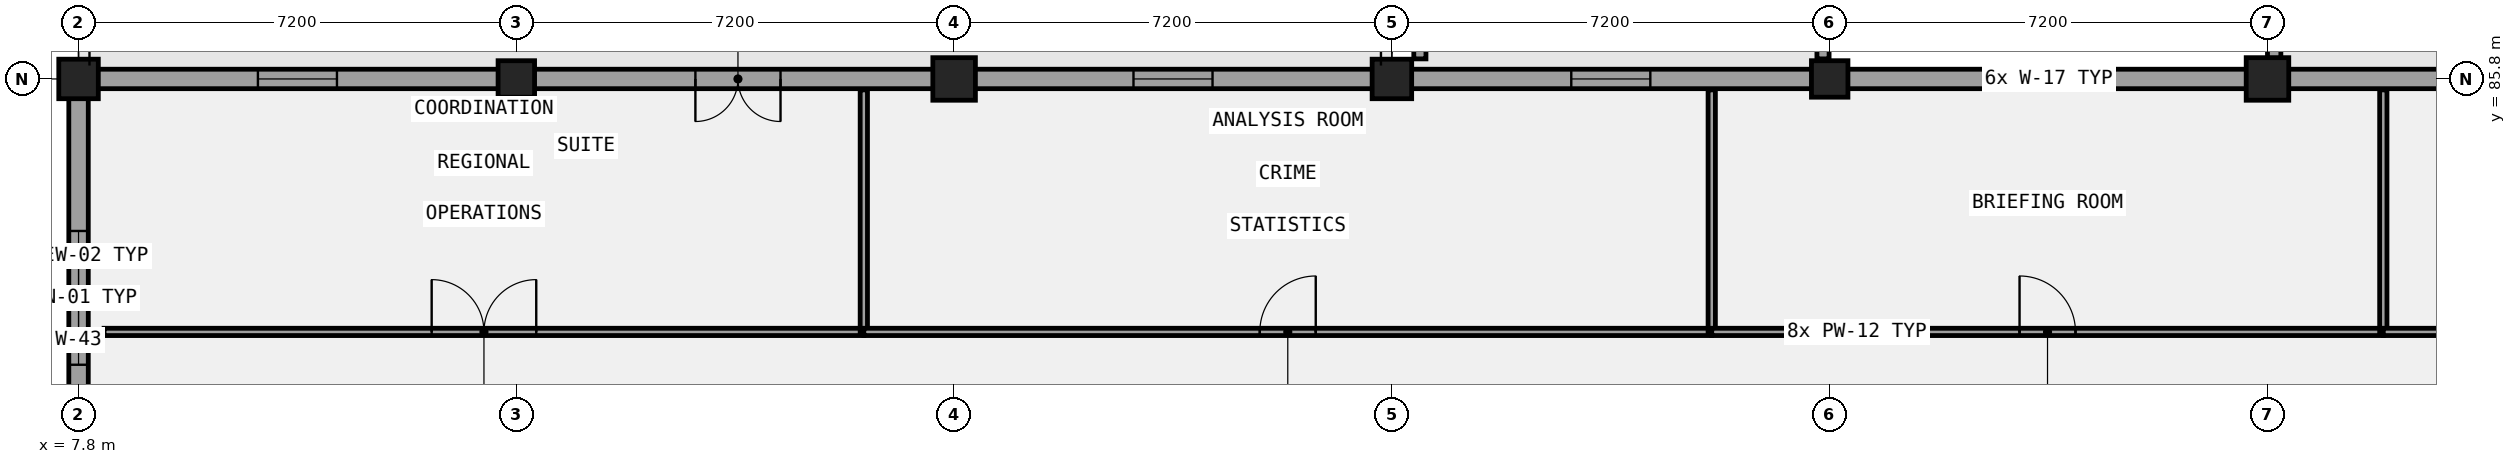
"""IFC4 building model, lengths in metres.
Left out: names, types, materials, properties, quantities, classifications, styles, units other than length and angle.
Written with IfcOpenShell. Run it as: python <this file> out.ifc"""

import sys

from ifc_helpers import new_model, si_unit, direction, frame, frame_2d, origin, origin_2d, place, context, subcontext, project, spatial, rectangle, extrude, element, fill, save


model = new_model("IFC4")
c1 = context("Model", 3, precision=1e-05, world=origin(), true_north=direction((0.0, 1.0)))
c2 = subcontext(c1, "Body", "Model", "MODEL_VIEW")
j1 = project(units=[si_unit("LENGTHUNIT", "METRE"), si_unit("PLANEANGLEUNIT", "RADIAN")], contexts=[c1])
p1 = place(None, origin())
s1 = spatial("IfcSite", under=j1, at=p1, CompositionType="ELEMENT")
p2 = place(p1, origin())
s2 = spatial("IfcBuilding", under=s1, at=p2, CompositionType="ELEMENT")
p3 = place(p2, frame((0.0, 0.0, 9.6)))
s3 = spatial("IfcBuildingStorey", under=s2, at=p3, CompositionType="ELEMENT", Elevation=9.6)
p4 = place(p3, frame((7.8, 85.8, 0.0), z_axis=(0.0, 0.0, 1.0), x_axis=(1.0, 0.0, 0.0)))
e1 = element("IfcColumn", 1, at=p4, inside=s3, PredefinedType="COLUMN", context=c2, shape_type="SweptSolid", body=[
    extrude(rectangle(XDim=0.65, YDim=0.65, at=origin_2d()), origin(), (0.0, 0.0, 1.0), 4.2),
])
p5 = place(p3, frame((15.0, 85.8, 0.0), z_axis=(0.0, 0.0, 1.0), x_axis=(1.0, 0.0, 0.0)))
e2 = element("IfcColumn", 2, at=p5, inside=s3, PredefinedType="COLUMN", context=c2, shape_type="SweptSolid", body=[
    extrude(rectangle(XDim=0.6, YDim=0.6, at=origin_2d()), origin(), (0.0, 0.0, 1.0), 4.2),
])
p6 = place(p3, frame((22.2, 85.8, 0.0), z_axis=(0.0, 0.0, 1.0), x_axis=(1.0, 0.0, 0.0)))
e3 = element("IfcColumn", 3, at=p6, inside=s3, PredefinedType="COLUMN", context=c2, shape_type="SweptSolid", body=[
    extrude(rectangle(XDim=0.7, YDim=0.7, at=origin_2d()), origin(), (0.0, 0.0, 1.0), 4.2),
])
p7 = place(p3, frame((29.4, 85.8, 0.0), z_axis=(0.0, 0.0, 1.0), x_axis=(1.0, 0.0, 0.0)))
e4 = element("IfcColumn", 4, at=p7, inside=s3, PredefinedType="COLUMN", context=c2, shape_type="SweptSolid", body=[
    extrude(rectangle(XDim=0.65, YDim=0.65, at=origin_2d()), origin(), (0.0, 0.0, 1.0), 4.2),
])
p8 = place(p3, frame((36.6, 85.8, 0.0), z_axis=(0.0, 0.0, 1.0), x_axis=(1.0, 0.0, 0.0)))
e5 = element("IfcColumn", 5, at=p8, inside=s3, PredefinedType="COLUMN", context=c2, shape_type="SweptSolid", body=[
    extrude(rectangle(XDim=0.6, YDim=0.6, at=origin_2d()), origin(), (0.0, 0.0, 1.0), 4.2),
])
p9 = place(p3, frame((43.8, 85.8, 0.0), z_axis=(0.0, 0.0, 1.0), x_axis=(1.0, 0.0, 0.0)))
e6 = element("IfcColumn", 6, at=p9, inside=s3, PredefinedType="COLUMN", context=c2, shape_type="SweptSolid", body=[
    extrude(rectangle(XDim=0.7, YDim=0.7, at=origin_2d()), origin(), (0.0, 0.0, 1.0), 4.2),
])
p10 = place(p3, frame((108.76, 85.8, 0.0), z_axis=(0.0, 0.0, 1.0), x_axis=(-1.0, 0.0, 0.0)))
e7 = element("IfcWall", 7, at=p10, inside=s3, PredefinedType="SOLIDWALL", context=c2, shape_type="SweptSolid", body=[
    extrude(rectangle(XDim=101.12, YDim=0.32, at=frame_2d((50.56, 0.0))), origin(), (0.0, 0.0, 1.0), 2.94),
])
p11 = place(p10, frame((89.415, 0.0, 0.0)))
e8 = element("IfcOpeningElement", 8, at=p11, cuts=e7, PredefinedType="OPENING", context=c2, shape_type="SweptSolid", body=[
    extrude(rectangle(XDim=1.4, YDim=2.2, at=frame_2d((0.7, 1.1))), frame((0.0, 0.17, 0.0), z_axis=(0.0, -1.0, 0.0), x_axis=(1.0, 0.0, 0.0)), (0.0, 0.0, 1.0), 0.34),
])
p12 = place(p10, frame((96.71, 0.0, 1.0)))
e9 = element("IfcOpeningElement", 9, at=p12, cuts=e7, PredefinedType="OPENING", context=c2, shape_type="SweptSolid", body=[
    extrude(rectangle(XDim=1.3, YDim=1.65, at=frame_2d((0.65, 0.825))), frame((0.0, 0.17, 0.0), z_axis=(0.0, -1.0, 0.0), x_axis=(1.0, 0.0, 0.0)), (0.0, 0.0, 1.0), 0.34),
])
p13 = place(p10, frame((82.31, 0.0, 1.0)))
e10 = element("IfcOpeningElement", 10, at=p13, cuts=e7, PredefinedType="OPENING", context=c2, shape_type="SweptSolid", body=[
    extrude(rectangle(XDim=1.3, YDim=1.65, at=frame_2d((0.65, 0.825))), frame((0.0, 0.17, 0.0), z_axis=(0.0, -1.0, 0.0), x_axis=(1.0, 0.0, 0.0)), (0.0, 0.0, 1.0), 0.34),
])
p14 = place(p10, frame((75.11, 0.0, 1.0)))
e11 = element("IfcOpeningElement", 11, at=p14, cuts=e7, PredefinedType="OPENING", context=c2, shape_type="SweptSolid", body=[
    extrude(rectangle(XDim=1.3, YDim=1.65, at=frame_2d((0.65, 0.825))), frame((0.0, 0.17, 0.0), z_axis=(0.0, -1.0, 0.0), x_axis=(1.0, 0.0, 0.0)), (0.0, 0.0, 1.0), 0.34),
])
p15 = place(p10, frame((67.91, 0.0, 1.0)))
e12 = element("IfcOpeningElement", 12, at=p15, cuts=e7, PredefinedType="OPENING", context=c2, shape_type="SweptSolid", body=[
    extrude(rectangle(XDim=1.3, YDim=1.65, at=frame_2d((0.65, 0.825))), frame((0.0, 0.17, 0.0), z_axis=(0.0, -1.0, 0.0), x_axis=(1.0, 0.0, 0.0)), (0.0, 0.0, 1.0), 0.34),
])
p16 = place(p10, frame((60.71, 0.0, 1.0)))
e13 = element("IfcOpeningElement", 13, at=p16, cuts=e7, PredefinedType="OPENING", context=c2, shape_type="SweptSolid", body=[
    extrude(rectangle(XDim=1.3, YDim=1.65, at=frame_2d((0.65, 0.825))), frame((0.0, 0.17, 0.0), z_axis=(0.0, -1.0, 0.0), x_axis=(1.0, 0.0, 0.0)), (0.0, 0.0, 1.0), 0.34),
])
p17 = place(p10, frame((53.51, 0.0, 1.0)))
e14 = element("IfcOpeningElement", 14, at=p17, cuts=e7, PredefinedType="OPENING", context=c2, shape_type="SweptSolid", body=[
    extrude(rectangle(XDim=1.3, YDim=1.65, at=frame_2d((0.65, 0.825))), frame((0.0, 0.17, 0.0), z_axis=(0.0, -1.0, 0.0), x_axis=(1.0, 0.0, 0.0)), (0.0, 0.0, 1.0), 0.34),
])
p18 = place(p10, frame((46.31, 0.0, 1.0)))
e15 = element("IfcOpeningElement", 15, at=p18, cuts=e7, PredefinedType="OPENING", context=c2, shape_type="SweptSolid", body=[
    extrude(rectangle(XDim=1.3, YDim=1.65, at=frame_2d((0.65, 0.825))), frame((0.0, 0.17, 0.0), z_axis=(0.0, -1.0, 0.0), x_axis=(1.0, 0.0, 0.0)), (0.0, 0.0, 1.0), 0.34),
])
p19 = place(p10, frame((39.11, 0.0, 1.0)))
e16 = element("IfcOpeningElement", 16, at=p19, cuts=e7, PredefinedType="OPENING", context=c2, shape_type="SweptSolid", body=[
    extrude(rectangle(XDim=1.3, YDim=1.65, at=frame_2d((0.65, 0.825))), frame((0.0, 0.17, 0.0), z_axis=(0.0, -1.0, 0.0), x_axis=(1.0, 0.0, 0.0)), (0.0, 0.0, 1.0), 0.34),
])
p20 = place(p10, frame((31.91, 0.0, 1.0)))
e17 = element("IfcOpeningElement", 17, at=p20, cuts=e7, PredefinedType="OPENING", context=c2, shape_type="SweptSolid", body=[
    extrude(rectangle(XDim=1.3, YDim=1.65, at=frame_2d((0.65, 0.825))), frame((0.0, 0.17, 0.0), z_axis=(0.0, -1.0, 0.0), x_axis=(1.0, 0.0, 0.0)), (0.0, 0.0, 1.0), 0.34),
])
p21 = place(p10, frame((24.71, 0.0, 1.0)))
e18 = element("IfcOpeningElement", 18, at=p21, cuts=e7, PredefinedType="OPENING", context=c2, shape_type="SweptSolid", body=[
    extrude(rectangle(XDim=1.3, YDim=1.65, at=frame_2d((0.65, 0.825))), frame((0.0, 0.17, 0.0), z_axis=(0.0, -1.0, 0.0), x_axis=(1.0, 0.0, 0.0)), (0.0, 0.0, 1.0), 0.34),
])
p22 = place(p10, frame((17.51, 0.0, 1.0)))
e19 = element("IfcOpeningElement", 19, at=p22, cuts=e7, PredefinedType="OPENING", context=c2, shape_type="SweptSolid", body=[
    extrude(rectangle(XDim=1.3, YDim=1.65, at=frame_2d((0.65, 0.825))), frame((0.0, 0.17, 0.0), z_axis=(0.0, -1.0, 0.0), x_axis=(1.0, 0.0, 0.0)), (0.0, 0.0, 1.0), 0.34),
])
p23 = place(p10, frame((10.31, 0.0, 1.0)))
e20 = element("IfcOpeningElement", 20, at=p23, cuts=e7, PredefinedType="OPENING", context=c2, shape_type="SweptSolid", body=[
    extrude(rectangle(XDim=1.3, YDim=1.65, at=frame_2d((0.65, 0.825))), frame((0.0, 0.17, 0.0), z_axis=(0.0, -1.0, 0.0), x_axis=(1.0, 0.0, 0.0)), (0.0, 0.0, 1.0), 0.34),
])
p24 = place(p10, frame((3.11, 0.0, 1.0)))
e21 = element("IfcOpeningElement", 21, at=p24, cuts=e7, PredefinedType="OPENING", context=c2, shape_type="SweptSolid", body=[
    extrude(rectangle(XDim=1.3, YDim=1.65, at=frame_2d((0.65, 0.825))), frame((0.0, 0.17, 0.0), z_axis=(0.0, -1.0, 0.0), x_axis=(1.0, 0.0, 0.0)), (0.0, 0.0, 1.0), 0.34),
])
p25 = place(p3, frame((7.8, 85.64, 0.0), z_axis=(0.0, 0.0, 1.0), x_axis=(0.0, -1.0, 0.0)))
e22 = element("IfcWall", 22, at=p25, inside=s3, PredefinedType="SOLIDWALL", context=c2, shape_type="SweptSolid", body=[
    extrude(rectangle(XDim=6.88, YDim=0.32, at=frame_2d((3.44, 0.0))), origin(), (0.0, 0.0, 1.0), 3.34),
])
p26 = place(p25, frame((2.34, 0.0, 1.0)))
e23 = element("IfcOpeningElement", 23, at=p26, cuts=e22, PredefinedType="OPENING", context=c2, shape_type="SweptSolid", body=[
    extrude(rectangle(XDim=2.2, YDim=1.9, at=frame_2d((1.1, 0.95))), frame((0.0, 0.17, 0.0), z_axis=(0.0, -1.0, 0.0), x_axis=(1.0, 0.0, 0.0)), (0.0, 0.0, 1.0), 0.34),
])
p27 = place(p3, frame((36.49, 107.18, 0.0), z_axis=(0.0, 0.0, 1.0), x_axis=(0.0, -1.0, 0.0)))
e24 = element("IfcWall", 24, at=p27, inside=s3, PredefinedType="PARAPET", context=c2, shape_type="SweptSolid", body=[
    extrude(rectangle(XDim=21.05, YDim=0.2, at=frame_2d((10.525, 0.0))), origin(), (0.0, 0.0, 1.0), 1.12),
])
p28 = place(p3, frame((29.86, 86.13, 0.0), z_axis=(0.0, 0.0, 1.0), x_axis=(0.0, 1.0, 0.0)))
e25 = element("IfcWall", 25, at=p28, inside=s3, PredefinedType="PARAPET", context=c2, shape_type="SweptSolid", body=[
    extrude(rectangle(XDim=2.36, YDim=0.2, at=frame_2d((1.18, 0.0))), origin(), (0.0, 0.0, 1.0), 1.12),
])
p29 = place(p3, frame((43.91, 86.14, 0.0), z_axis=(0.0, 0.0, 1.0), x_axis=(0.0, 1.0, 0.0)))
e26 = element("IfcWall", 26, at=p29, inside=s3, PredefinedType="PARAPET", context=c2, shape_type="SweptSolid", body=[
    extrude(rectangle(XDim=6.676, YDim=0.22, at=frame_2d((3.338, 0.0))), origin(), (0.0, 0.0, 1.0), 1.12),
])
p30 = place(p3, frame((8.22, 81.64, 0.0), z_axis=(0.0, 0.0, 1.0), x_axis=(1.0, 0.0, 0.0)))
e27 = element("IfcWall", 27, at=p30, inside=s3, PredefinedType="PARTITIONING", context=c2, shape_type="SweptSolid", body=[
    extrude(rectangle(XDim=12.495, YDim=0.12, at=frame_2d((6.248, 0.0))), origin(), (0.0, 0.0, 1.0), 3.94),
])
p31 = place(p30, frame((5.387, 0.0, 0.0)))
e28 = element("IfcOpeningElement", 28, at=p31, cuts=e27, PredefinedType="OPENING", context=c2, shape_type="SweptSolid", body=[
    extrude(rectangle(XDim=1.72, YDim=2.35, at=frame_2d((0.86, 1.175))), frame((0.0, 0.07, 0.0), z_axis=(0.0, -1.0, 0.0), x_axis=(1.0, 0.0, 0.0)), (0.0, 0.0, 1.0), 0.14),
])
p32 = place(p3, frame((20.715, 81.64, 0.0), z_axis=(0.0, 0.0, 1.0), x_axis=(0.0, 1.0, 0.0)))
e29 = element("IfcWall", 29, at=p32, inside=s3, PredefinedType="PARTITIONING", context=c2, shape_type="SweptSolid", body=[
    extrude(rectangle(XDim=3.98, YDim=0.12, at=frame_2d((1.99, 0.0))), origin(), (0.0, 0.0, 1.0), 3.94),
])
p33 = place(p3, frame((20.715, 81.64, 0.0), z_axis=(0.0, 0.0, 1.0), x_axis=(1.0, 0.0, 0.0)))
e30 = element("IfcWall", 30, at=p33, inside=s3, PredefinedType="PARTITIONING", context=c2, shape_type="SweptSolid", body=[
    extrude(rectangle(XDim=13.945, YDim=0.12, at=frame_2d((6.972, 0.0))), origin(), (0.0, 0.0, 1.0), 3.94),
])
p34 = place(p33, frame((6.512, 0.0, 0.0)))
e31 = element("IfcOpeningElement", 31, at=p34, cuts=e30, PredefinedType="OPENING", context=c2, shape_type="SweptSolid", body=[
    extrude(rectangle(XDim=0.92, YDim=2.1, at=frame_2d((0.46, 1.05))), frame((0.0, 0.07, 0.0), z_axis=(0.0, -1.0, 0.0), x_axis=(1.0, 0.0, 0.0)), (0.0, 0.0, 1.0), 0.14),
])
p35 = place(p3, frame((34.66, 81.64, 0.0), z_axis=(0.0, 0.0, 1.0), x_axis=(0.0, 1.0, 0.0)))
e32 = element("IfcWall", 32, at=p35, inside=s3, PredefinedType="PARTITIONING", context=c2, shape_type="SweptSolid", body=[
    extrude(rectangle(XDim=3.98, YDim=0.12, at=frame_2d((1.99, 0.0))), origin(), (0.0, 0.0, 1.0), 3.94),
])
p36 = place(p3, frame((34.66, 81.64, 0.0), z_axis=(0.0, 0.0, 1.0), x_axis=(1.0, 0.0, 0.0)))
e33 = element("IfcWall", 33, at=p36, inside=s3, PredefinedType="PARTITIONING", context=c2, shape_type="SweptSolid", body=[
    extrude(rectangle(XDim=11.045, YDim=0.12, at=frame_2d((5.522, 0.0))), origin(), (0.0, 0.0, 1.0), 3.94),
])
p37 = place(p36, frame((5.062, 0.0, 0.0)))
e34 = element("IfcOpeningElement", 34, at=p37, cuts=e33, PredefinedType="OPENING", context=c2, shape_type="SweptSolid", body=[
    extrude(rectangle(XDim=0.92, YDim=2.22, at=frame_2d((0.46, 1.11))), frame((0.0, 0.07, 0.0), z_axis=(0.0, -1.0, 0.0), x_axis=(1.0, 0.0, 0.0)), (0.0, 0.0, 1.0), 0.14),
])
p38 = place(p3, frame((45.705, 81.64, 0.0), z_axis=(0.0, 0.0, 1.0), x_axis=(0.0, 1.0, 0.0)))
e35 = element("IfcWall", 35, at=p38, inside=s3, PredefinedType="PARTITIONING", context=c2, shape_type="SweptSolid", body=[
    extrude(rectangle(XDim=3.98, YDim=0.12, at=frame_2d((1.99, 0.0))), origin(), (0.0, 0.0, 1.0), 3.94),
])
p39 = place(p3, frame((45.705, 81.64, 0.0), z_axis=(0.0, 0.0, 1.0), x_axis=(1.0, 0.0, 0.0)))
e36 = element("IfcWall", 36, at=p39, inside=s3, PredefinedType="PARTITIONING", context=c2, shape_type="SweptSolid", body=[
    extrude(rectangle(XDim=12.495, YDim=0.12, at=frame_2d((6.248, 0.0))), origin(), (0.0, 0.0, 1.0), 3.94),
])
p40 = place(p39, frame((5.788, 0.0, 0.0)))
e37 = element("IfcOpeningElement", 37, at=p40, cuts=e36, PredefinedType="OPENING", context=c2, shape_type="SweptSolid", body=[
    extrude(rectangle(XDim=0.92, YDim=2.35, at=frame_2d((0.46, 1.175))), frame((0.0, 0.07, 0.0), z_axis=(0.0, -1.0, 0.0), x_axis=(1.0, 0.0, 0.0)), (0.0, 0.0, 1.0), 0.14),
])
p41 = place(p11, frame((1.4, 0.0, 0.0), z_axis=(0.0, 0.0, 1.0), x_axis=(-1.0, 0.0, 0.0)))
e38 = element("IfcDoor", 38, at=p41, inside=s3, OperationType="DOUBLE_DOOR_SINGLE_SWING", PredefinedType="DOOR", context=c2, shape_type="SweptSolid", body=[
    extrude(rectangle(XDim=1.4, YDim=2.2, at=frame_2d((0.7, 1.1))), frame((0.0, 0.025, 0.0), z_axis=(0.0, -1.0, 0.0), x_axis=(1.0, 0.0, 0.0)), (0.0, 0.0, 1.0), 0.05),
])
fill(e8, e38)
p42 = place(p12, origin())
e39 = element("IfcWindow", 39, at=p42, inside=s3, PartitioningType="SINGLE_PANEL", PredefinedType="WINDOW", context=c2, shape_type="SweptSolid", body=[
    extrude(rectangle(XDim=1.3, YDim=1.65, at=frame_2d((0.65, 0.825))), frame((0.0, 0.03, 0.0), z_axis=(0.0, -1.0, 0.0), x_axis=(1.0, 0.0, 0.0)), (0.0, 0.0, 1.0), 0.06),
])
fill(e9, e39)
p43 = place(p13, origin())
e40 = element("IfcWindow", 40, at=p43, inside=s3, PartitioningType="SINGLE_PANEL", PredefinedType="WINDOW", context=c2, shape_type="SweptSolid", body=[
    extrude(rectangle(XDim=1.3, YDim=1.65, at=frame_2d((0.65, 0.825))), frame((0.0, 0.03, 0.0), z_axis=(0.0, -1.0, 0.0), x_axis=(1.0, 0.0, 0.0)), (0.0, 0.0, 1.0), 0.06),
])
fill(e10, e40)
p44 = place(p14, origin())
e41 = element("IfcWindow", 41, at=p44, inside=s3, PartitioningType="SINGLE_PANEL", PredefinedType="WINDOW", context=c2, shape_type="SweptSolid", body=[
    extrude(rectangle(XDim=1.3, YDim=1.65, at=frame_2d((0.65, 0.825))), frame((0.0, 0.03, 0.0), z_axis=(0.0, -1.0, 0.0), x_axis=(1.0, 0.0, 0.0)), (0.0, 0.0, 1.0), 0.06),
])
fill(e11, e41)
p45 = place(p15, origin())
e42 = element("IfcWindow", 42, at=p45, inside=s3, PartitioningType="SINGLE_PANEL", PredefinedType="WINDOW", context=c2, shape_type="SweptSolid", body=[
    extrude(rectangle(XDim=1.3, YDim=1.65, at=frame_2d((0.65, 0.825))), frame((0.0, 0.03, 0.0), z_axis=(0.0, -1.0, 0.0), x_axis=(1.0, 0.0, 0.0)), (0.0, 0.0, 1.0), 0.06),
])
fill(e12, e42)
p46 = place(p26, origin())
e43 = element("IfcWindow", 43, at=p46, inside=s3, PartitioningType="SINGLE_PANEL", PredefinedType="WINDOW", context=c2, shape_type="SweptSolid", body=[
    extrude(rectangle(XDim=2.2, YDim=1.9, at=frame_2d((1.1, 0.95))), frame((0.0, 0.03, 0.0), z_axis=(0.0, -1.0, 0.0), x_axis=(1.0, 0.0, 0.0)), (0.0, 0.0, 1.0), 0.06),
])
fill(e23, e43)
p47 = place(p31, origin())
e44 = element("IfcDoor", 44, at=p47, inside=s3, OperationType="DOUBLE_DOOR_SINGLE_SWING", PredefinedType="DOOR", context=c2, shape_type="SweptSolid", body=[
    extrude(rectangle(XDim=1.72, YDim=2.35, at=frame_2d((0.86, 1.175))), frame((0.0, 0.025, 0.0), z_axis=(0.0, -1.0, 0.0), x_axis=(1.0, 0.0, 0.0)), (0.0, 0.0, 1.0), 0.05),
])
fill(e28, e44)
p48 = place(p34, origin())
e45 = element("IfcDoor", 45, at=p48, inside=s3, OperationType="SINGLE_SWING_RIGHT", PredefinedType="DOOR", context=c2, shape_type="SweptSolid", body=[
    extrude(rectangle(XDim=0.92, YDim=2.1, at=frame_2d((0.46, 1.05))), frame((0.0, 0.025, 0.0), z_axis=(0.0, -1.0, 0.0), x_axis=(1.0, 0.0, 0.0)), (0.0, 0.0, 1.0), 0.05),
])
fill(e31, e45)
p49 = place(p37, origin())
e46 = element("IfcDoor", 46, at=p49, inside=s3, OperationType="SINGLE_SWING_LEFT", PredefinedType="DOOR", context=c2, shape_type="SweptSolid", body=[
    extrude(rectangle(XDim=0.92, YDim=2.22, at=frame_2d((0.46, 1.11))), frame((0.0, 0.025, 0.0), z_axis=(0.0, -1.0, 0.0), x_axis=(1.0, 0.0, 0.0)), (0.0, 0.0, 1.0), 0.05),
])
fill(e34, e46)
save(model, sys.argv[1])
